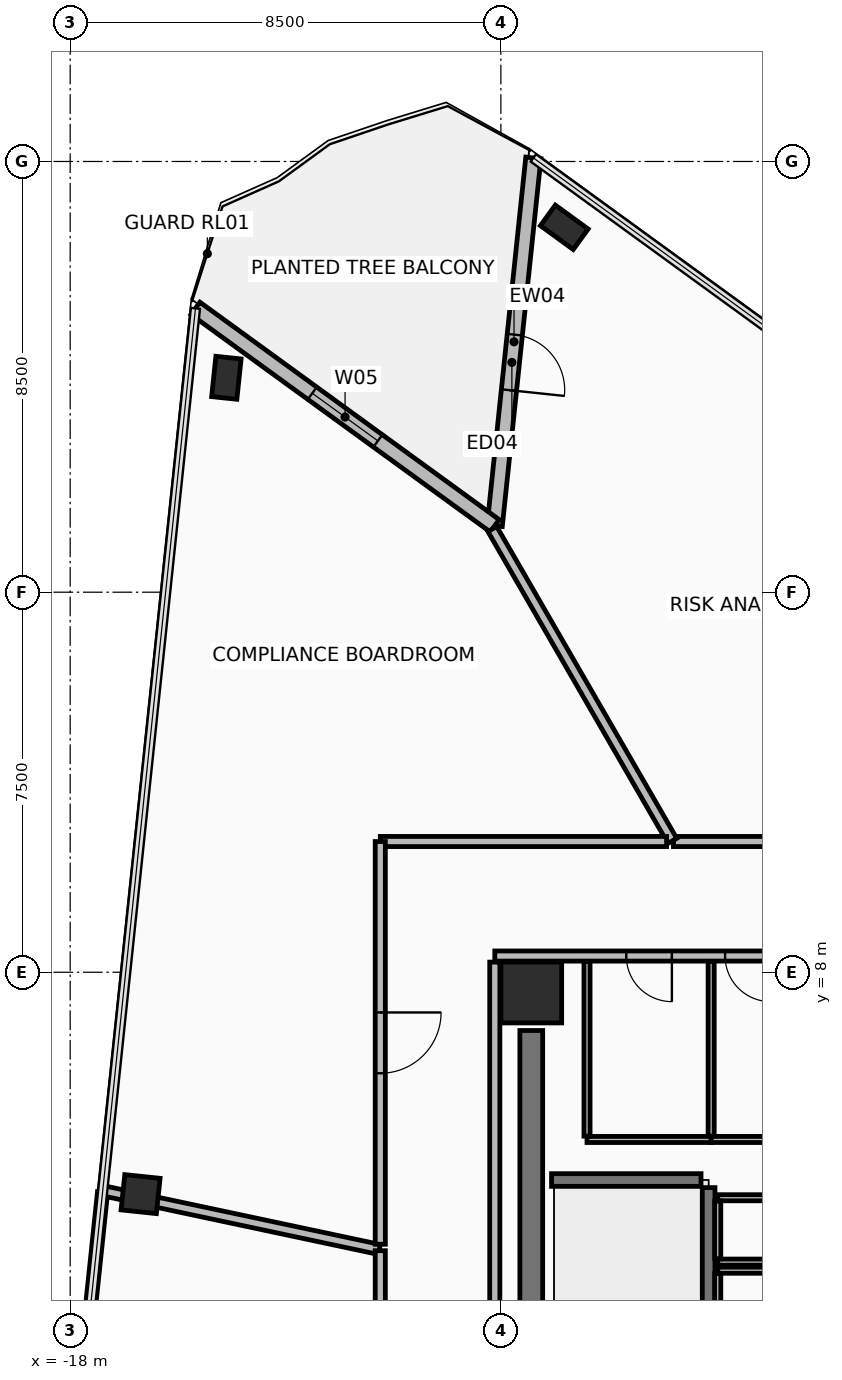
"""IFC4 building model, lengths in metres.
Left out: names, types, materials, properties, quantities, classifications, styles, units other than length and angle.
Written with IfcOpenShell. Run it as: python <this file> out.ifc"""

import sys

from ifc_helpers import new_model, si_unit, direction, frame, frame_2d, origin, origin_2d, place, context, subcontext, project, spatial, rectangle, hollow_rectangle, extrude, element, fill, save


model = new_model("IFC4")
c1 = context("Model", 3, precision=1e-05, world=origin(), true_north=direction((0.0, 1.0)))
c2 = subcontext(c1, "Body", "Model", "MODEL_VIEW")
j1 = project(units=[si_unit("LENGTHUNIT", "METRE"), si_unit("PLANEANGLEUNIT", "RADIAN")], contexts=[c1])
p1 = place(None, origin())
s1 = spatial("IfcSite", under=j1, at=p1, CompositionType="ELEMENT")
p2 = place(p1, origin())
s2 = spatial("IfcBuilding", under=s1, at=p2, CompositionType="ELEMENT")
p3 = place(p2, frame((0.0, 0.0, 116.05)))
s3 = spatial("IfcBuildingStorey", under=s2, at=p3, CompositionType="ELEMENT", Elevation=116.05)
p4 = place(p3, frame((-8.9, 7.6, 0.0), z_axis=(0.0, 0.0, 1.0), x_axis=(1.0, 0.0, 0.0)))
e1 = element("IfcColumn", 1, at=p4, inside=s3, PredefinedType="COLUMN", context=c2, shape_type="SweptSolid", body=[
    extrude(rectangle(XDim=1.2, YDim=1.2, at=origin_2d()), origin(), (0.0, 0.0, 1.0), 3.6),
])
p5 = place(p3, frame((-14.917, 19.731, 0.0), z_axis=(0.0, 0.0, 1.0), x_axis=(0.104530199036, 0.99452171293, 0.0)))
e2 = element("IfcColumn", 2, at=p5, inside=s3, PredefinedType="COLUMN", context=c2, shape_type="SweptSolid", body=[
    extrude(hollow_rectangle(XDim=0.5, YDim=0.8, WallThickness=0.04, at=origin_2d()), origin(), (0.0, 0.0, 1.0), 3.6),
])
p6 = place(p3, frame((-16.611, 3.622, 0.0), z_axis=(0.0, 0.0, 1.0), x_axis=(0.104530199036, 0.99452171293, 0.0)))
e3 = element("IfcColumn", 3, at=p6, inside=s3, PredefinedType="COLUMN", context=c2, shape_type="SweptSolid", body=[
    extrude(hollow_rectangle(XDim=0.7, YDim=0.7, WallThickness=0.04, at=origin_2d()), origin(), (0.0, 0.0, 1.0), 3.6),
])
p7 = place(p3, frame((-8.249, 22.701, 0.0), z_axis=(0.0, 0.0, 1.0), x_axis=(-0.809016994375, 0.587785252292, 0.0)))
e4 = element("IfcColumn", 4, at=p7, inside=s3, PredefinedType="COLUMN", context=c2, shape_type="SweptSolid", body=[
    extrude(hollow_rectangle(XDim=0.5, YDim=0.8, WallThickness=0.04, at=origin_2d()), origin(), (0.0, 0.0, 1.0), 3.6),
])
p8 = place(p3, frame((-8.859, 24.071, 0.0), z_axis=(0.0, 0.0, 1.0), x_axis=(-0.104512431924, -0.9945235802, 0.0)))
e5 = element("IfcWall", 5, at=p8, inside=s3, PredefinedType="STANDARD", context=c2, shape_type="SweptSolid", body=[
    extrude(rectangle(XDim=7.3, YDim=0.3, at=frame_2d((3.65, 0.0))), origin(), (0.0, 0.0, 1.0), 2.705),
])
p9 = place(p8, frame((3.508, 0.0, 0.0)))
e6 = element("IfcOpeningElement", 6, at=p9, cuts=e5, PredefinedType="OPENING", context=c2, shape_type="SweptSolid", body=[
    extrude(rectangle(XDim=1.1, YDim=2.2, at=frame_2d((0.55, 1.1))), frame((0.0, 0.16, 0.0), z_axis=(0.0, -1.0, 0.0), x_axis=(1.0, 0.0, 0.0)), (0.0, 0.0, 1.0), 0.32),
])
p10 = place(p3, frame((-9.622, 16.811, 0.0), z_axis=(0.0, 0.0, 1.0), x_axis=(-0.809002104592, 0.587805745775, 0.0)))
e7 = element("IfcWall", 7, at=p10, inside=s3, PredefinedType="STANDARD", context=c2, shape_type="SweptSolid", body=[
    extrude(rectangle(XDim=7.3, YDim=0.3, at=frame_2d((3.65, 0.0))), origin(), (0.0, 0.0, 1.0), 2.705),
])
p11 = place(p10, frame((2.85, 0.0, 0.325)))
e8 = element("IfcOpeningElement", 8, at=p11, cuts=e7, PredefinedType="OPENING", context=c2, shape_type="SweptSolid", body=[
    extrude(rectangle(XDim=1.6, YDim=2.2, at=frame_2d((0.8, 1.1))), frame((0.0, 0.16, 0.0), z_axis=(0.0, -1.0, 0.0), x_axis=(1.0, 0.0, 0.0)), (0.0, 0.0, 1.0), 0.32),
])
p12 = place(p3, frame((-8.9, -3.85, 0.0), z_axis=(0.0, 0.0, 1.0), x_axis=(0.0, 1.0, 0.0)))
e9 = element("IfcWall", 9, at=p12, inside=s3, PredefinedType="SHEAR", context=c2, shape_type="SweptSolid", body=[
    extrude(rectangle(XDim=10.7, YDim=0.45, at=frame_2d((5.35, 0.0))), origin(), (0.0, 0.0, 1.0), 3.41),
])
p13 = place(p3, frame((9.62, 8.32, 0.0), z_axis=(0.0, 0.0, 1.0), x_axis=(-1.0, 0.0, 0.0)))
e10 = element("IfcWall", 10, at=p13, inside=s3, PredefinedType="PARTITIONING", context=c2, shape_type="SweptSolid", body=[
    extrude(rectangle(XDim=19.24, YDim=0.2, at=frame_2d((9.62, 0.0))), origin(), (0.0, 0.0, 1.0), 2.755),
])
p14 = place(p13, frame((15.745, 0.0, 0.0)))
e11 = element("IfcOpeningElement", 11, at=p14, cuts=e10, PredefinedType="OPENING", context=c2, shape_type="SweptSolid", body=[
    extrude(rectangle(XDim=0.9, YDim=2.1, at=frame_2d((0.45, 1.05))), frame((0.0, 0.11, 0.0), z_axis=(0.0, -1.0, 0.0), x_axis=(1.0, 0.0, 0.0)), (0.0, 0.0, 1.0), 0.22),
])
p15 = place(p13, frame((13.795, 0.0, 0.0)))
e12 = element("IfcOpeningElement", 12, at=p15, cuts=e10, PredefinedType="OPENING", context=c2, shape_type="SweptSolid", body=[
    extrude(rectangle(XDim=0.9, YDim=2.1, at=frame_2d((0.45, 1.05))), frame((0.0, 0.11, 0.0), z_axis=(0.0, -1.0, 0.0), x_axis=(1.0, 0.0, 0.0)), (0.0, 0.0, 1.0), 0.22),
])
p16 = place(p3, frame((-9.62, 8.2, 0.0), z_axis=(0.0, 0.0, 1.0), x_axis=(0.0, -1.0, 0.0)))
e13 = element("IfcWall", 13, at=p16, inside=s3, PredefinedType="PARTITIONING", context=c2, shape_type="SweptSolid", body=[
    extrude(rectangle(XDim=16.4, YDim=0.2, at=frame_2d((8.2, 0.0))), origin(), (0.0, 0.0, 1.0), 2.855),
])
p17 = place(p16, frame((12.65, 0.0, 0.0)))
e14 = element("IfcOpeningElement", 14, at=p17, cuts=e13, PredefinedType="OPENING", context=c2, shape_type="SweptSolid", body=[
    extrude(rectangle(XDim=1.1, YDim=2.15, at=frame_2d((0.55, 1.075))), frame((0.0, 0.11, 0.0), z_axis=(0.0, -1.0, 0.0), x_axis=(1.0, 0.0, 0.0)), (0.0, 0.0, 1.0), 0.22),
])
p18 = place(p3, frame((-5.4, -3.55, 0.0), z_axis=(0.0, 0.0, 1.0), x_axis=(0.0, 1.0, 0.0)))
e15 = element("IfcWall", 15, at=p18, inside=s3, PredefinedType="SHEAR", context=c2, shape_type="SweptSolid", body=[
    extrude(rectangle(XDim=7.3, YDim=0.25, at=frame_2d((3.65, 0.0))), origin(), (0.0, 0.0, 1.0), 3.41),
])
p19 = place(p3, frame((-8.5, 3.9, 0.0), z_axis=(0.0, 0.0, 1.0), x_axis=(1.0, 0.0, 0.0)))
e16 = element("IfcWall", 16, at=p19, inside=s3, PredefinedType="SHEAR", context=c2, shape_type="SweptSolid", body=[
    extrude(rectangle(XDim=2.95, YDim=0.25, at=frame_2d((1.475, 0.0))), origin(), (0.0, 0.0, 1.0), 3.41),
])
p20 = place(p3, frame((-5.22, 2.28, 0.0), z_axis=(0.0, 0.0, 1.0), x_axis=(1.0, 0.0, 0.0)))
e17 = element("IfcWall", 17, at=p20, inside=s3, PredefinedType="PARTITIONING", context=c2, shape_type="SweptSolid", body=[
    extrude(rectangle(XDim=3.47, YDim=0.12, at=frame_2d((1.735, 0.0))), origin(), (0.0, 0.0, 1.0), 3.41),
])
p21 = place(p3, frame((-1.815, 3.55, 0.0), z_axis=(0.0, 0.0, 1.0), x_axis=(-1.0, 0.0, 0.0)))
e18 = element("IfcWall", 18, at=p21, inside=s3, PredefinedType="PARTITIONING", context=c2, shape_type="SweptSolid", body=[
    extrude(rectangle(XDim=3.405, YDim=0.12, at=frame_2d((1.703, 0.0))), origin(), (0.0, 0.0, 1.0), 3.41),
])
p22 = place(p3, frame((-5.22, 3.485, 0.0), z_axis=(0.0, 0.0, 1.0), x_axis=(0.0, -1.0, 0.0)))
e19 = element("IfcWall", 19, at=p22, inside=s3, PredefinedType="PARTITIONING", context=c2, shape_type="SweptSolid", body=[
    extrude(rectangle(XDim=1.14, YDim=0.12, at=frame_2d((0.57, 0.0))), origin(), (0.0, 0.0, 1.0), 3.41),
])
p23 = place(p3, frame((-1.815, 2.12, 0.0), z_axis=(0.0, 0.0, 1.0), x_axis=(-1.0, 0.0, 0.0)))
e20 = element("IfcWall", 20, at=p23, inside=s3, PredefinedType="PARTITIONING", context=c2, shape_type="SweptSolid", body=[
    extrude(rectangle(XDim=3.405, YDim=0.12, at=frame_2d((1.703, 0.0))), origin(), (0.0, 0.0, 1.0), 3.41),
])
p24 = place(p3, frame((-5.22, 2.055, 0.0), z_axis=(0.0, 0.0, 1.0), x_axis=(0.0, -1.0, 0.0)))
e21 = element("IfcWall", 21, at=p24, inside=s3, PredefinedType="PARTITIONING", context=c2, shape_type="SweptSolid", body=[
    extrude(rectangle(XDim=1.11, YDim=0.12, at=frame_2d((0.555, 0.0))), origin(), (0.0, 0.0, 1.0), 3.41),
])
p25 = place(p3, frame((-7.8, 4.7, 0.0), z_axis=(0.0, 0.0, 1.0), x_axis=(1.0, 0.0, 0.0)))
e22 = element("IfcWall", 22, at=p25, inside=s3, PredefinedType="PARTITIONING", context=c2, shape_type="SweptSolid", body=[
    extrude(rectangle(XDim=2.45, YDim=0.12, at=frame_2d((1.225, 0.0))), origin(), (0.0, 0.0, 1.0), 3.41),
])
for number, where, z_axis, x_axis in (
    (23, (-5.35, 4.765, 0.0), (0.0, 0.0, 1.0), (0.0, 1.0, 0.0)),
    (24, (-7.8, 8.215, 0.0), (0.0, 0.0, 1.0), (0.0, -1.0, 0.0)),
):
    element("IfcWall", number, at=place(p3, frame(where, z_axis=z_axis, x_axis=x_axis)), inside=s3, PredefinedType="PARTITIONING", context=c2, shape_type="SweptSolid", body=[
        extrude(rectangle(XDim=3.45, YDim=0.12, at=frame_2d((1.725, 0.0))), origin(), (0.0, 0.0, 1.0), 2.605),
    ])
p26 = place(p3, frame((-5.35, 4.7, 0.0), z_axis=(0.0, 0.0, 1.0), x_axis=(1.0, 0.0, 0.0)))
e25 = element("IfcWall", 25, at=p26, inside=s3, PredefinedType="PARTITIONING", context=c2, shape_type="SweptSolid", body=[
    extrude(rectangle(XDim=1.45, YDim=0.12, at=frame_2d((0.725, 0.0))), origin(), (0.0, 0.0, 1.0), 3.41),
])
p27 = place(p3, frame((-19.067, -12.57, 0.0), z_axis=(0.0, 0.0, 1.0), x_axis=(0.104530607356, 0.994521670013, 0.0)))
e26 = element("IfcWall", 26, at=p27, inside=s3, PredefinedType="PARTITIONING", context=c2, shape_type="SweptSolid", body=[
    extrude(rectangle(XDim=16.321, YDim=0.2, at=frame_2d((8.161, 0.0))), origin(), (0.0, 0.0, 1.0), 3.41),
])
p28 = place(p3, frame((-17.331, 3.684, 0.0), z_axis=(0.0, 0.0, 1.0), x_axis=(0.978148567961, -0.207907140322, 0.0)))
e27 = element("IfcWall", 27, at=p28, inside=s3, PredefinedType="PARTITIONING", context=c2, shape_type="SweptSolid", body=[
    extrude(rectangle(XDim=5.552, YDim=0.2, at=frame_2d((2.776, 0.0))), origin(), (0.0, 0.0, 1.0), 2.705),
])
p29 = place(p3, frame((-11.88, 2.505, 0.0), z_axis=(0.0, 0.0, 1.0), x_axis=(0.0, -1.0, 0.0)))
e28 = element("IfcWall", 28, at=p29, inside=s3, PredefinedType="PARTITIONING", context=c2, shape_type="SweptSolid", body=[
    extrude(rectangle(XDim=9.396, YDim=0.2, at=frame_2d((4.698, 0.0))), origin(), (0.0, 0.0, 1.0), 3.41),
])
p30 = place(p29, frame((4.273, 0.0, 0.0)))
e29 = element("IfcOpeningElement", 29, at=p30, cuts=e28, PredefinedType="OPENING", context=c2, shape_type="SweptSolid", body=[
    extrude(rectangle(XDim=0.85, YDim=2.1, at=frame_2d((0.425, 1.05))), frame((0.0, 0.11, 0.0), z_axis=(0.0, -1.0, 0.0), x_axis=(1.0, 0.0, 0.0)), (0.0, 0.0, 1.0), 0.22),
])
p31 = place(p3, frame((3.419, 10.58, 0.0), z_axis=(0.0, 0.0, 1.0), x_axis=(-1.0, 0.0, 0.0)))
e30 = element("IfcWall", 30, at=p31, inside=s3, PredefinedType="PARTITIONING", context=c2, shape_type="SweptSolid", body=[
    extrude(rectangle(XDim=9.513, YDim=0.2, at=frame_2d((4.757, 0.0))), origin(), (0.0, 0.0, 1.0), 3.045),
])
p32 = place(p31, frame((4.257, 0.0, 0.0)))
e31 = element("IfcOpeningElement", 31, at=p32, cuts=e30, PredefinedType="OPENING", context=c2, shape_type="SweptSolid", body=[
    extrude(rectangle(XDim=1.0, YDim=2.15, at=frame_2d((0.5, 1.075))), frame((0.0, 0.11, 0.0), z_axis=(0.0, -1.0, 0.0), x_axis=(1.0, 0.0, 0.0)), (0.0, 0.0, 1.0), 0.22),
])
p33 = place(p3, frame((-6.115, 10.593, 0.0), z_axis=(0.0, 0.0, 1.0), x_axis=(-0.50001885532, 0.866014517387, 0.0)))
e32 = element("IfcWall", 32, at=p33, inside=s3, PredefinedType="PARTITIONING", context=c2, shape_type="SweptSolid", body=[
    extrude(rectangle(XDim=7.106, YDim=0.2, at=frame_2d((3.553, 0.0))), origin(), (0.0, 0.0, 1.0), 2.855),
])
p34 = place(p3, frame((-6.229, 10.58, 0.0), z_axis=(0.0, 0.0, 1.0), x_axis=(-1.0, 0.0, 0.0)))
e33 = element("IfcWall", 33, at=p34, inside=s3, PredefinedType="PARTITIONING", context=c2, shape_type="SweptSolid", body=[
    extrude(rectangle(XDim=5.65, YDim=0.2, at=frame_2d((2.825, 0.0))), origin(), (0.0, 0.0, 1.0), 2.755),
])
p35 = place(p3, frame((-11.88, 10.579, 0.0), z_axis=(0.0, 0.0, 1.0), x_axis=(0.0, -1.0, 0.0)))
e34 = element("IfcWall", 34, at=p35, inside=s3, PredefinedType="PARTITIONING", context=c2, shape_type="SweptSolid", body=[
    extrude(rectangle(XDim=7.947, YDim=0.2, at=frame_2d((3.973, 0.0))), origin(), (0.0, 0.0, 1.0), 2.855),
])
p36 = place(p35, frame((3.373, 0.0, 0.0)))
e35 = element("IfcOpeningElement", 35, at=p36, cuts=e34, PredefinedType="OPENING", context=c2, shape_type="SweptSolid", body=[
    extrude(rectangle(XDim=1.2, YDim=2.15, at=frame_2d((0.6, 1.075))), frame((0.0, 0.11, 0.0), z_axis=(0.0, -1.0, 0.0), x_axis=(1.0, 0.0, 0.0)), (0.0, 0.0, 1.0), 0.22),
])
p37 = place(p9, frame((1.1, 0.0, 0.0), z_axis=(0.0, 0.0, 1.0), x_axis=(-1.0, 0.0, 0.0)))
e36 = element("IfcDoor", 36, at=p37, inside=s3, OperationType="SINGLE_SWING_LEFT", PredefinedType="DOOR", context=c2, shape_type="SweptSolid", body=[
    extrude(rectangle(XDim=1.1, YDim=2.2, at=frame_2d((0.55, 1.1))), frame((0.0, 0.025, 0.0), z_axis=(0.0, -1.0, 0.0), x_axis=(1.0, 0.0, 0.0)), (0.0, 0.0, 1.0), 0.05),
])
fill(e6, e36)
p38 = place(p11, origin())
e37 = element("IfcWindow", 37, at=p38, inside=s3, PartitioningType="SINGLE_PANEL", PredefinedType="WINDOW", context=c2, shape_type="SweptSolid", body=[
    extrude(rectangle(XDim=1.6, YDim=2.2, at=frame_2d((0.8, 1.1))), frame((0.0, 0.03, 0.0), z_axis=(0.0, -1.0, 0.0), x_axis=(1.0, 0.0, 0.0)), (0.0, 0.0, 1.0), 0.06),
])
fill(e8, e37)
p39 = place(p14, origin())
e38 = element("IfcDoor", 38, at=p39, inside=s3, OperationType="SINGLE_SWING_LEFT", PredefinedType="DOOR", context=c2, shape_type="SweptSolid", body=[
    extrude(rectangle(XDim=0.9, YDim=2.1, at=frame_2d((0.45, 1.05))), frame((0.0, 0.025, 0.0), z_axis=(0.0, -1.0, 0.0), x_axis=(1.0, 0.0, 0.0)), (0.0, 0.0, 1.0), 0.05),
])
fill(e11, e38)
p40 = place(p15, origin())
e39 = element("IfcDoor", 39, at=p40, inside=s3, OperationType="SINGLE_SWING_LEFT", PredefinedType="DOOR", context=c2, shape_type="SweptSolid", body=[
    extrude(rectangle(XDim=0.9, YDim=2.1, at=frame_2d((0.45, 1.05))), frame((0.0, 0.025, 0.0), z_axis=(0.0, -1.0, 0.0), x_axis=(1.0, 0.0, 0.0)), (0.0, 0.0, 1.0), 0.05),
])
fill(e12, e39)
p41 = place(p36, origin())
e40 = element("IfcDoor", 40, at=p41, inside=s3, OperationType="SINGLE_SWING_LEFT", PredefinedType="DOOR", context=c2, shape_type="SweptSolid", body=[
    extrude(rectangle(XDim=1.2, YDim=2.15, at=frame_2d((0.6, 1.075))), frame((0.0, 0.025, 0.0), z_axis=(0.0, -1.0, 0.0), x_axis=(1.0, 0.0, 0.0)), (0.0, 0.0, 1.0), 0.05),
])
fill(e35, e40)
save(model, sys.argv[1])
